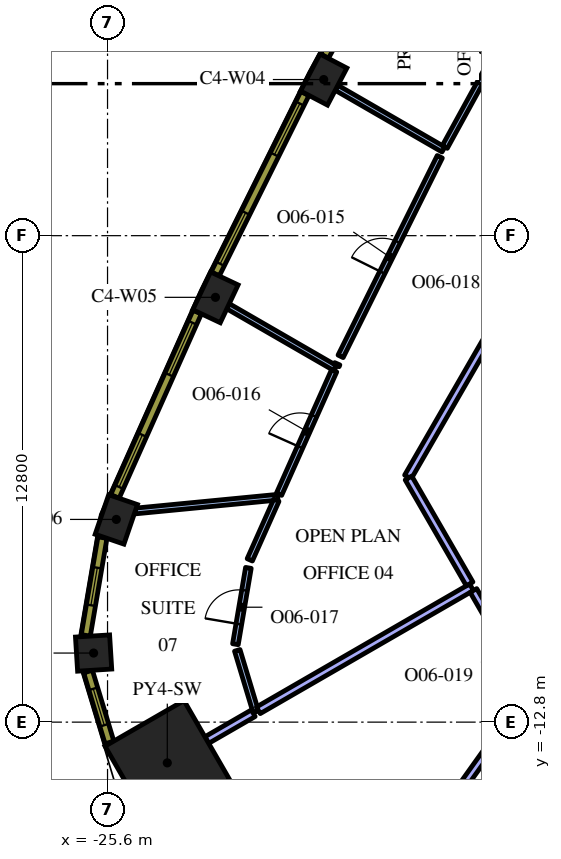
"""IFC4 building model, lengths in metres.
Left out: names, types, materials, properties, quantities, classifications, styles, units other than length and angle.
Written with IfcOpenShell. Run it as: python <this file> out.ifc"""

import sys

from ifc_helpers import new_model, si_unit, direction, frame, frame_2d, origin, origin_2d, place, context, subcontext, project, spatial, rectangle, extrude, element, fill, save


model = new_model("IFC4")
c1 = context("Model", 3, precision=1e-05, world=origin(), true_north=direction((0.0, 1.0)))
c2 = subcontext(c1, "Body", "Model", "MODEL_VIEW")
j1 = project(units=[si_unit("LENGTHUNIT", "METRE"), si_unit("PLANEANGLEUNIT", "RADIAN")], contexts=[c1])
p1 = place(None, origin())
s1 = spatial("IfcSite", under=j1, at=p1, CompositionType="ELEMENT")
p2 = place(p1, origin())
s2 = spatial("IfcBuilding", under=s1, at=p2, CompositionType="ELEMENT")
p3 = place(p2, frame((0.0, 0.0, 205.8)))
s3 = spatial("IfcBuildingStorey", under=s2, at=p3, CompositionType="ELEMENT", Elevation=205.8)
p4 = place(p3, frame((-24.027, -13.872, 0.0), z_axis=(0.0, 0.0, 1.0), x_axis=(-0.866025403784, -0.5, 0.0)))
e1 = element("IfcColumn", 1, at=p4, inside=s3, PredefinedType="COLUMN", context=c2, shape_type="SweptSolid", body=[
    extrude(rectangle(XDim=2.4, YDim=2.4, at=origin_2d()), origin(), (0.0, 0.0, 1.0), 4.2),
])
for number, where, z_axis, x_axis in (
    (2, (-19.912, 4.108, 0.0), (0.0, 0.0, 1.0), (-0.464, -0.886, 0.0)),
    (3, (-22.76, -1.623, 0.0), (0.0, 0.0, 1.0), (-0.426, -0.905, 0.0)),
    (4, (-25.369, -7.466, 0.0), (0.0, 0.0, 1.0), (-0.324, -0.946, 0.0)),
):
    element("IfcColumn", number, at=place(p3, frame(where, z_axis=z_axis, x_axis=x_axis)), inside=s3, PredefinedType="COLUMN", context=c2, shape_type="SweptSolid", body=[
        extrude(rectangle(XDim=1.1, YDim=0.8, at=origin_2d()), origin(), (0.0, 0.0, 1.0), 4.2),
    ])
p5 = place(p3, frame((-25.967, -10.982, 0.0), z_axis=(0.0, 0.0, 1.0), x_axis=(0.062217428964, -0.998062619044, 0.0)))
e5 = element("IfcColumn", 5, at=p5, inside=s3, PredefinedType="COLUMN", context=c2, shape_type="SweptSolid", body=[
    extrude(rectangle(XDim=0.9, YDim=0.9, at=origin_2d()), origin(), (0.0, 0.0, 1.0), 4.2),
])
p6 = place(p3, frame((-18.709, -17.916, 0.0), z_axis=(0.0, 0.0, 1.0), x_axis=(0.581023578026, 0.813886725397, 0.0)))
e6 = element("IfcWall", 6, at=p6, inside=s3, PredefinedType="PARTITIONING", context=c2, shape_type="SweptSolid", body=[
    extrude(rectangle(XDim=7.318, YDim=0.2, at=frame_2d((3.659, 0.0))), origin(), (0.0, 0.0, 1.0), 3.45),
])
p7 = place(p3, frame((-16.761, 2.268, 0.0), z_axis=(0.0, 0.0, 1.0), x_axis=(-0.866022812202, 0.500004488726, 0.0)))
e7 = element("IfcWall", 7, at=p7, inside=s3, PredefinedType="PARTITIONING", context=c2, shape_type="SweptSolid", body=[
    extrude(rectangle(XDim=3.247, YDim=0.15, at=frame_2d((1.624, 0.0))), origin(), (0.0, 0.0, 1.0), 3.45),
])
p8 = place(p3, frame((-16.725, 2.333, 0.0), z_axis=(0.0, 0.0, 1.0), x_axis=(0.480955103875, 0.876745224142, 0.0)))
e8 = element("IfcWall", 8, at=p8, inside=s3, PredefinedType="PARTITIONING", context=c2, shape_type="SweptSolid", body=[
    extrude(rectangle(XDim=6.129, YDim=0.15, at=frame_2d((3.064, 0.0))), origin(), (0.0, 0.0, 1.0), 3.45),
])
p9 = place(p8, frame((2.629, 0.0, 0.0)))
e9 = element("IfcOpeningElement", 9, at=p9, cuts=e8, PredefinedType="OPENING", context=c2, shape_type="SweptSolid", body=[
    extrude(rectangle(XDim=0.9, YDim=2.1, at=frame_2d((0.45, 1.05))), frame((0.0, 0.085, 0.0), z_axis=(0.0, -1.0, 0.0), x_axis=(1.0, 0.0, 0.0)), (0.0, 0.0, 1.0), 0.17),
])
p10 = place(p3, frame((-19.606, -3.487, 0.0), z_axis=(0.0, 0.0, 1.0), x_axis=(-0.866017179828, 0.50001424404, 0.0)))
e10 = element("IfcWall", 10, at=p10, inside=s3, PredefinedType="PARTITIONING", context=c2, shape_type="SweptSolid", body=[
    extrude(rectangle(XDim=3.259, YDim=0.15, at=frame_2d((1.63, 0.0))), origin(), (0.0, 0.0, 1.0), 3.45),
])
p11 = place(p3, frame((-19.467, -3.175, 0.0), z_axis=(0.0, 0.0, 1.0), x_axis=(0.445180755526, 0.895440726631, 0.0)))
e11 = element("IfcWall", 11, at=p11, inside=s3, PredefinedType="PARTITIONING", context=c2, shape_type="SweptSolid", body=[
    extrude(rectangle(XDim=5.864, YDim=0.15, at=frame_2d((2.932, 0.0))), origin(), (0.0, 0.0, 1.0), 3.45),
])
p12 = place(p11, frame((2.464, 0.0, 0.0)))
e12 = element("IfcOpeningElement", 12, at=p12, cuts=e11, PredefinedType="OPENING", context=c2, shape_type="SweptSolid", body=[
    extrude(rectangle(XDim=0.9, YDim=2.1, at=frame_2d((0.45, 1.05))), frame((0.0, 0.085, 0.0), z_axis=(0.0, -1.0, 0.0), x_axis=(1.0, 0.0, 0.0)), (0.0, 0.0, 1.0), 0.17),
])
p13 = place(p3, frame((-19.554, -3.371, 0.0), z_axis=(0.0, 0.0, 1.0), x_axis=(-0.408782924594, -0.912631645605, 0.0)))
e13 = element("IfcWall", 13, at=p13, inside=s3, PredefinedType="PARTITIONING", context=c2, shape_type="SweptSolid", body=[
    extrude(rectangle(XDim=0.051, YDim=0.15, at=frame_2d((0.026, 0.0))), origin(), (0.0, 0.0, 1.0), 3.45),
])
p14 = place(p3, frame((-21.122, -6.882, 0.0), z_axis=(0.0, 0.0, 1.0), x_axis=(-0.995354824533, -0.096274468471, 0.0)))
e14 = element("IfcWall", 14, at=p14, inside=s3, PredefinedType="PARTITIONING", context=c2, shape_type="SweptSolid", body=[
    extrude(rectangle(XDim=3.766, YDim=0.15, at=frame_2d((1.883, 0.0))), origin(), (0.0, 0.0, 1.0), 3.45),
])
p15 = place(p3, frame((-21.087, -6.803, 0.0), z_axis=(0.0, 0.0, 1.0), x_axis=(0.40757725445, 0.913170729741, 0.0)))
e15 = element("IfcWall", 15, at=p15, inside=s3, PredefinedType="PARTITIONING", context=c2, shape_type="SweptSolid", body=[
    extrude(rectangle(XDim=3.557, YDim=0.15, at=frame_2d((1.778, 0.0))), origin(), (0.0, 0.0, 1.0), 3.45),
])
p16 = place(p15, frame((1.357, 0.0, 0.0)))
e16 = element("IfcOpeningElement", 16, at=p16, cuts=e15, PredefinedType="OPENING", context=c2, shape_type="SweptSolid", body=[
    extrude(rectangle(XDim=0.9, YDim=2.1, at=frame_2d((0.45, 1.05))), frame((0.0, 0.085, 0.0), z_axis=(0.0, -1.0, 0.0), x_axis=(1.0, 0.0, 0.0)), (0.0, 0.0, 1.0), 0.17),
])
p17 = place(p3, frame((-21.157, -6.961, 0.0), z_axis=(0.0, 0.0, 1.0), x_axis=(-0.407627569492, -0.913148270869, 0.0)))
e17 = element("IfcWall", 17, at=p17, inside=s3, PredefinedType="PARTITIONING", context=c2, shape_type="SweptSolid", body=[
    extrude(rectangle(XDim=1.718, YDim=0.15, at=frame_2d((0.859, 0.0))), origin(), (0.0, 0.0, 1.0), 3.45),
])
p18 = place(p3, frame((-22.235, -10.75, 0.0), z_axis=(0.0, 0.0, 1.0), x_axis=(0.167623442148, 0.985851095066, 0.0)))
e18 = element("IfcWall", 18, at=p18, inside=s3, PredefinedType="PARTITIONING", context=c2, shape_type="SweptSolid", body=[
    extrude(rectangle(XDim=2.038, YDim=0.15, at=frame_2d((1.019, 0.0))), origin(), (0.0, 0.0, 1.0), 3.45),
])
p19 = place(p18, frame((0.538, 0.0, 0.0)))
e19 = element("IfcOpeningElement", 19, at=p19, cuts=e18, PredefinedType="OPENING", context=c2, shape_type="SweptSolid", body=[
    extrude(rectangle(XDim=0.9, YDim=2.1, at=frame_2d((0.45, 1.05))), frame((0.0, 0.085, 0.0), z_axis=(0.0, -1.0, 0.0), x_axis=(1.0, 0.0, 0.0)), (0.0, 0.0, 1.0), 0.17),
])
p20 = place(p3, frame((-22.186, -10.911, 0.0), z_axis=(0.0, 0.0, 1.0), x_axis=(0.288899576463, -0.957359407286, 0.0)))
e20 = element("IfcWall", 20, at=p20, inside=s3, PredefinedType="PARTITIONING", context=c2, shape_type="SweptSolid", body=[
    extrude(rectangle(XDim=1.688, YDim=0.15, at=frame_2d((0.844, 0.0))), origin(), (0.0, 0.0, 1.0), 3.45),
])
p21 = place(p3, frame((-21.765, -12.566, 0.0), z_axis=(0.0, 0.0, 1.0), x_axis=(-0.866021473228, -0.500006807861, 0.0)))
e21 = element("IfcWall", 21, at=p21, inside=s3, PredefinedType="PARTITIONING", context=c2, shape_type="SweptSolid", body=[
    extrude(rectangle(XDim=1.412, YDim=0.2, at=frame_2d((0.706, 0.0))), origin(), (0.0, 0.0, 1.0), 3.45),
])
p22 = place(p3, frame((-16.021, -9.25, 0.0), z_axis=(0.0, 0.0, 1.0), x_axis=(-0.86601739438, -0.500013872438, 0.0)))
e22 = element("IfcWall", 22, at=p22, inside=s3, PredefinedType="PARTITIONING", context=c2, shape_type="SweptSolid", body=[
    extrude(rectangle(XDim=6.478, YDim=0.2, at=frame_2d((3.239, 0.0))), origin(), (0.0, 0.0, 1.0), 3.45),
])
p23 = place(p3, frame((-12.787, 2.152, 0.0), z_axis=(0.0, 0.0, 1.0), x_axis=(-0.50000660679, -0.866021589319, 0.0)))
e23 = element("IfcWall", 23, at=p23, inside=s3, PredefinedType="PARTITIONING", context=c2, shape_type="SweptSolid", body=[
    extrude(rectangle(XDim=9.817, YDim=0.2, at=frame_2d((4.909, 0.0))), origin(), (0.0, 0.0, 1.0), 3.45),
])
p24 = place(p23, frame((4.4, 0.0, 0.0)))
e24 = element("IfcOpeningElement", 24, at=p24, cuts=e23, PredefinedType="OPENING", context=c2, shape_type="SweptSolid", body=[
    extrude(rectangle(XDim=1.0, YDim=2.1, at=frame_2d((0.5, 1.05))), frame((0.0, 0.11, 0.0), z_axis=(0.0, -1.0, 0.0), x_axis=(1.0, 0.0, 0.0)), (0.0, 0.0, 1.0), 0.22),
])
p25 = place(p3, frame((-17.681, -6.376, 0.0), z_axis=(0.0, 0.0, 1.0), x_axis=(0.500022299258, -0.866012528919, 0.0)))
e25 = element("IfcWall", 25, at=p25, inside=s3, PredefinedType="PARTITIONING", context=c2, shape_type="SweptSolid", body=[
    extrude(rectangle(XDim=3.219, YDim=0.2, at=frame_2d((1.609, 0.0))), origin(), (0.0, 0.0, 1.0), 3.45),
])
p26 = place(p3, frame((-15.971, -9.337, 0.0), z_axis=(0.0, 0.0, 1.0), x_axis=(0.500007233661, -0.866021227388, 0.0)))
e26 = element("IfcWall", 26, at=p26, inside=s3, PredefinedType="PARTITIONING", context=c2, shape_type="SweptSolid", body=[
    extrude(rectangle(XDim=2.919, YDim=0.2, at=frame_2d((1.459, 0.0))), origin(), (0.0, 0.0, 1.0), 3.45),
])
p27 = place(p26, frame((1.0, 0.0, 0.0)))
e27 = element("IfcOpeningElement", 27, at=p27, cuts=e26, PredefinedType="OPENING", context=c2, shape_type="SweptSolid", body=[
    extrude(rectangle(XDim=1.0, YDim=2.1, at=frame_2d((0.5, 1.05))), frame((0.0, 0.11, 0.0), z_axis=(0.0, -1.0, 0.0), x_axis=(1.0, 0.0, 0.0)), (0.0, 0.0, 1.0), 0.22),
])
p28 = place(p3, frame((-17.338, 9.368, 0.0), z_axis=(0.0, 0.0, 1.0), x_axis=(-0.481925825015, -0.876212017256, 0.0)))
e28 = element("IfcWall", 28, at=p28, inside=s3, PredefinedType="SOLIDWALL", context=c2, shape_type="SweptSolid", body=[
    extrude(rectangle(XDim=5.299, YDim=0.24, at=frame_2d((2.649, 0.0))), origin(), (0.0, 0.0, 1.0), 3.95),
])
p29 = place(p28, frame((0.295, 0.0, 0.9)))
e29 = element("IfcOpeningElement", 29, at=p29, cuts=e28, PredefinedType="OPENING", context=c2, shape_type="SweptSolid", body=[
    extrude(rectangle(XDim=1.5, YDim=2.55, at=frame_2d((0.75, 1.275))), frame((0.0, 0.13, 0.0), z_axis=(0.0, -1.0, 0.0), x_axis=(1.0, 0.0, 0.0)), (0.0, 0.0, 1.0), 0.26),
])
p30 = place(p28, frame((3.504, 0.0, 0.9)))
e30 = element("IfcOpeningElement", 30, at=p30, cuts=e28, PredefinedType="OPENING", context=c2, shape_type="SweptSolid", body=[
    extrude(rectangle(XDim=1.5, YDim=2.55, at=frame_2d((0.75, 1.275))), frame((0.0, 0.13, 0.0), z_axis=(0.0, -1.0, 0.0), x_axis=(1.0, 0.0, 0.0)), (0.0, 0.0, 1.0), 0.26),
])
p31 = place(p3, frame((-20.407, 3.74, 0.0), z_axis=(0.0, 0.0, 1.0), x_axis=(-0.445129582031, -0.895466166419, 0.0)))
e31 = element("IfcWall", 31, at=p31, inside=s3, PredefinedType="SOLIDWALL", context=c2, shape_type="SweptSolid", body=[
    extrude(rectangle(XDim=5.298, YDim=0.24, at=frame_2d((2.649, 0.0))), origin(), (0.0, 0.0, 1.0), 3.95),
])
p32 = place(p31, frame((0.295, 0.0, 0.9)))
e32 = element("IfcOpeningElement", 32, at=p32, cuts=e31, PredefinedType="OPENING", context=c2, shape_type="SweptSolid", body=[
    extrude(rectangle(XDim=1.5, YDim=2.55, at=frame_2d((0.75, 1.275))), frame((0.0, 0.13, 0.0), z_axis=(0.0, -1.0, 0.0), x_axis=(1.0, 0.0, 0.0)), (0.0, 0.0, 1.0), 0.26),
])
p33 = place(p31, frame((3.504, 0.0, 0.9)))
e33 = element("IfcOpeningElement", 33, at=p33, cuts=e31, PredefinedType="OPENING", context=c2, shape_type="SweptSolid", body=[
    extrude(rectangle(XDim=1.5, YDim=2.55, at=frame_2d((0.75, 1.275))), frame((0.0, 0.13, 0.0), z_axis=(0.0, -1.0, 0.0), x_axis=(1.0, 0.0, 0.0)), (0.0, 0.0, 1.0), 0.26),
])
p34 = place(p3, frame((-23.24, -2.011, 0.0), z_axis=(0.0, 0.0, 1.0), x_axis=(-0.407579651789, -0.913169659728, 0.0)))
e34 = element("IfcWall", 34, at=p34, inside=s3, PredefinedType="SOLIDWALL", context=c2, shape_type="SweptSolid", body=[
    extrude(rectangle(XDim=5.311, YDim=0.24, at=frame_2d((2.655, 0.0))), origin(), (0.0, 0.0, 1.0), 3.95),
])
p35 = place(p34, frame((0.306, 0.0, 0.9)))
e35 = element("IfcOpeningElement", 35, at=p35, cuts=e34, PredefinedType="OPENING", context=c2, shape_type="SweptSolid", body=[
    extrude(rectangle(XDim=1.5, YDim=2.55, at=frame_2d((0.75, 1.275))), frame((0.0, 0.13, 0.0), z_axis=(0.0, -1.0, 0.0), x_axis=(1.0, 0.0, 0.0)), (0.0, 0.0, 1.0), 0.26),
])
p36 = place(p34, frame((3.539, 0.0, 0.9)))
e36 = element("IfcOpeningElement", 36, at=p36, cuts=e34, PredefinedType="OPENING", context=c2, shape_type="SweptSolid", body=[
    extrude(rectangle(XDim=1.5, YDim=2.55, at=frame_2d((0.75, 1.275))), frame((0.0, 0.13, 0.0), z_axis=(0.0, -1.0, 0.0), x_axis=(1.0, 0.0, 0.0)), (0.0, 0.0, 1.0), 0.26),
])
p37 = place(p3, frame((-25.734, -7.945, 0.0), z_axis=(0.0, 0.0, 1.0), x_axis=(-0.167660055546, -0.985844869021, 0.0)))
e37 = element("IfcWall", 37, at=p37, inside=s3, PredefinedType="SOLIDWALL", context=c2, shape_type="SweptSolid", body=[
    extrude(rectangle(XDim=2.609, YDim=0.24, at=frame_2d((1.305, 0.0))), origin(), (0.0, 0.0, 1.0), 3.95),
])
p38 = place(p37, frame((0.805, 0.0, 0.9)))
e38 = element("IfcOpeningElement", 38, at=p38, cuts=e37, PredefinedType="OPENING", context=c2, shape_type="SweptSolid", body=[
    extrude(rectangle(XDim=1.0, YDim=2.55, at=frame_2d((0.5, 1.275))), frame((0.0, 0.13, 0.0), z_axis=(0.0, -1.0, 0.0), x_axis=(1.0, 0.0, 0.0)), (0.0, 0.0, 1.0), 0.26),
])
p39 = place(p3, frame((-26.112, -11.469, 0.0), z_axis=(0.0, 0.0, 1.0), x_axis=(0.288727209095, -0.957411405159, 0.0)))
e39 = element("IfcWall", 39, at=p39, inside=s3, PredefinedType="SOLIDWALL", context=c2, shape_type="SweptSolid", body=[
    extrude(rectangle(XDim=1.948, YDim=0.24, at=frame_2d((0.974, 0.0))), origin(), (0.0, 0.0, 1.0), 3.95),
])
p40 = place(p39, frame((0.474, 0.0, 0.9)))
e40 = element("IfcOpeningElement", 40, at=p40, cuts=e39, PredefinedType="OPENING", context=c2, shape_type="SweptSolid", body=[
    extrude(rectangle(XDim=1.0, YDim=2.55, at=frame_2d((0.5, 1.275))), frame((0.0, 0.13, 0.0), z_axis=(0.0, -1.0, 0.0), x_axis=(1.0, 0.0, 0.0)), (0.0, 0.0, 1.0), 0.26),
])
p41 = place(p12, origin())
e41 = element("IfcDoor", 41, at=p41, inside=s3, OperationType="SINGLE_SWING_LEFT", PredefinedType="DOOR", context=c2, shape_type="SweptSolid", body=[
    extrude(rectangle(XDim=0.9, YDim=2.1, at=frame_2d((0.45, 1.05))), frame((0.0, 0.025, 0.0), z_axis=(0.0, -1.0, 0.0), x_axis=(1.0, 0.0, 0.0)), (0.0, 0.0, 1.0), 0.05),
])
fill(e12, e41)
p42 = place(p16, origin())
e42 = element("IfcDoor", 42, at=p42, inside=s3, OperationType="SINGLE_SWING_RIGHT", PredefinedType="DOOR", context=c2, shape_type="SweptSolid", body=[
    extrude(rectangle(XDim=0.9, YDim=2.1, at=frame_2d((0.45, 1.05))), frame((0.0, 0.025, 0.0), z_axis=(0.0, -1.0, 0.0), x_axis=(1.0, 0.0, 0.0)), (0.0, 0.0, 1.0), 0.05),
])
fill(e16, e42)
p43 = place(p19, origin())
e43 = element("IfcDoor", 43, at=p43, inside=s3, OperationType="SINGLE_SWING_LEFT", PredefinedType="DOOR", context=c2, shape_type="SweptSolid", body=[
    extrude(rectangle(XDim=0.9, YDim=2.1, at=frame_2d((0.45, 1.05))), frame((0.0, 0.025, 0.0), z_axis=(0.0, -1.0, 0.0), x_axis=(1.0, 0.0, 0.0)), (0.0, 0.0, 1.0), 0.05),
])
fill(e19, e43)
p44 = place(p32, origin())
e44 = element("IfcWindow", 44, at=p44, inside=s3, PartitioningType="SINGLE_PANEL", PredefinedType="WINDOW", context=c2, shape_type="SweptSolid", body=[
    extrude(rectangle(XDim=1.5, YDim=2.55, at=frame_2d((0.75, 1.275))), frame((0.0, 0.04, 0.0), z_axis=(0.0, -1.0, 0.0), x_axis=(1.0, 0.0, 0.0)), (0.0, 0.0, 1.0), 0.06),
])
fill(e32, e44)
p45 = place(p33, origin())
e45 = element("IfcWindow", 45, at=p45, inside=s3, PartitioningType="SINGLE_PANEL", PredefinedType="WINDOW", context=c2, shape_type="SweptSolid", body=[
    extrude(rectangle(XDim=1.5, YDim=2.55, at=frame_2d((0.75, 1.275))), frame((0.0, 0.04, 0.0), z_axis=(0.0, -1.0, 0.0), x_axis=(1.0, 0.0, 0.0)), (0.0, 0.0, 1.0), 0.06),
])
fill(e33, e45)
p46 = place(p35, origin())
e46 = element("IfcWindow", 46, at=p46, inside=s3, PartitioningType="SINGLE_PANEL", PredefinedType="WINDOW", context=c2, shape_type="SweptSolid", body=[
    extrude(rectangle(XDim=1.5, YDim=2.55, at=frame_2d((0.75, 1.275))), frame((0.0, 0.04, 0.0), z_axis=(0.0, -1.0, 0.0), x_axis=(1.0, 0.0, 0.0)), (0.0, 0.0, 1.0), 0.06),
])
fill(e35, e46)
p47 = place(p36, origin())
e47 = element("IfcWindow", 47, at=p47, inside=s3, PartitioningType="SINGLE_PANEL", PredefinedType="WINDOW", context=c2, shape_type="SweptSolid", body=[
    extrude(rectangle(XDim=1.5, YDim=2.55, at=frame_2d((0.75, 1.275))), frame((0.0, 0.04, 0.0), z_axis=(0.0, -1.0, 0.0), x_axis=(1.0, 0.0, 0.0)), (0.0, 0.0, 1.0), 0.06),
])
fill(e36, e47)
p48 = place(p38, origin())
e48 = element("IfcWindow", 48, at=p48, inside=s3, PartitioningType="SINGLE_PANEL", PredefinedType="WINDOW", context=c2, shape_type="SweptSolid", body=[
    extrude(rectangle(XDim=1.0, YDim=2.55, at=frame_2d((0.5, 1.275))), frame((0.0, 0.04, 0.0), z_axis=(0.0, -1.0, 0.0), x_axis=(1.0, 0.0, 0.0)), (0.0, 0.0, 1.0), 0.06),
])
fill(e38, e48)
p49 = place(p40, origin())
e49 = element("IfcWindow", 49, at=p49, inside=s3, PartitioningType="SINGLE_PANEL", PredefinedType="WINDOW", context=c2, shape_type="SweptSolid", body=[
    extrude(rectangle(XDim=1.0, YDim=2.55, at=frame_2d((0.5, 1.275))), frame((0.0, 0.04, 0.0), z_axis=(0.0, -1.0, 0.0), x_axis=(1.0, 0.0, 0.0)), (0.0, 0.0, 1.0), 0.06),
])
fill(e40, e49)
save(model, sys.argv[1])
